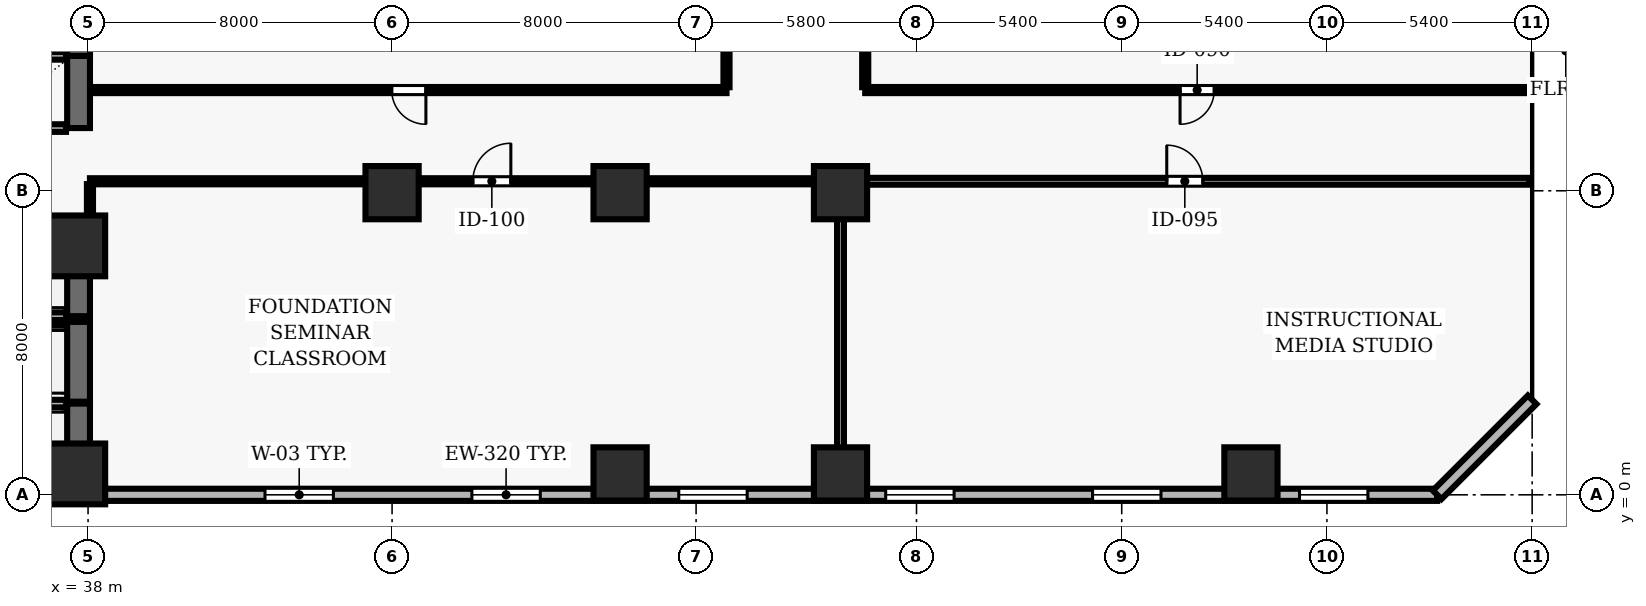
"""IFC4 building model, lengths in metres.
Left out: names, types, materials, properties, quantities, classifications, styles, units other than length and angle.
Written with IfcOpenShell. Run it as: python <this file> out.ifc"""

import sys

from ifc_helpers import new_model, si_unit, direction, frame, frame_2d, origin, origin_2d, place, context, subcontext, project, spatial, rectangle, extrude, element, fill, save


model = new_model("IFC4")
c1 = context("Model", 3, precision=1e-05, world=origin(), true_north=direction((0.0, 1.0)))
c2 = subcontext(c1, "Body", "Model", "MODEL_VIEW")
j1 = project(units=[si_unit("LENGTHUNIT", "METRE"), si_unit("PLANEANGLEUNIT", "RADIAN")], contexts=[c1])
p1 = place(None, origin())
s1 = spatial("IfcSite", under=j1, at=p1, CompositionType="ELEMENT")
p2 = place(p1, origin())
s2 = spatial("IfcBuilding", under=s1, at=p2, CompositionType="ELEMENT")
p3 = place(p2, frame((0.0, 0.0, 10.4)))
s3 = spatial("IfcBuildingStorey", under=s2, at=p3, CompositionType="ELEMENT", Elevation=10.4)
for number, where, z_axis, x_axis in (
    (1, (37.65, 0.55, 0.0), (0.0, 0.0, 1.0), (1.0, 0.0, 0.0)),
    (2, (37.65, 6.55, 0.0), (0.0, 0.0, 1.0), (1.0, 0.0, 0.0)),
):
    element("IfcColumn", number, at=place(p3, frame(where, z_axis=z_axis, x_axis=x_axis)), inside=s3, PredefinedType="COLUMN", context=c2, shape_type="SweptSolid", body=[
        extrude(rectangle(XDim=1.6, YDim=1.6, at=origin_2d()), origin(), (0.0, 0.0, 1.0), 5.2),
    ])
for number, where, z_axis, x_axis in (
    (3, (46.0, 7.95, 0.0), (0.0, 0.0, 1.0), (1.0, 0.0, 0.0)),
    (4, (52.0, 0.55, 0.0), (0.0, 0.0, 1.0), (1.0, 0.0, 0.0)),
    (5, (52.0, 7.95, 0.0), (0.0, 0.0, 1.0), (1.0, 0.0, 0.0)),
    (6, (57.8, 0.55, 0.0), (0.0, 0.0, 1.0), (1.0, 0.0, 0.0)),
    (7, (57.8, 7.95, 0.0), (0.0, 0.0, 1.0), (1.0, 0.0, 0.0)),
    (8, (68.6, 0.55, 0.0), (0.0, 0.0, 1.0), (1.0, 0.0, 0.0)),
):
    element("IfcColumn", number, at=place(p3, frame(where, z_axis=z_axis, x_axis=x_axis)), inside=s3, PredefinedType="COLUMN", context=c2, shape_type="SweptSolid", body=[
        extrude(rectangle(XDim=1.4, YDim=1.4, at=origin_2d()), origin(), (0.0, 0.0, 1.0), 5.2),
    ])
p4 = place(p3, frame((24.5, 0.0, 0.0), z_axis=(0.0, 0.0, 1.0), x_axis=(1.0, 0.0, 0.0)))
e9 = element("IfcWall", 9, at=p4, inside=s3, PredefinedType="SOLIDWALL", context=c2, shape_type="SweptSolid", body=[
    extrude(rectangle(XDim=49.0, YDim=0.32, at=frame_2d((24.5, 0.0))), origin(), (0.0, 0.0, 1.0), 4.92),
])
p5 = place(p4, frame((1.822, 0.0, 0.9)))
e10 = element("IfcOpeningElement", 10, at=p5, cuts=e9, PredefinedType="OPENING", context=c2, shape_type="SweptSolid", body=[
    extrude(rectangle(XDim=1.8, YDim=1.6, at=frame_2d((0.9, 0.8))), frame((0.0, 0.17, 0.0), z_axis=(0.0, -1.0, 0.0), x_axis=(1.0, 0.0, 0.0)), (0.0, 0.0, 1.0), 0.34),
])
p6 = place(p4, frame((18.156, 0.0, 0.9)))
e11 = element("IfcOpeningElement", 11, at=p6, cuts=e9, PredefinedType="OPENING", context=c2, shape_type="SweptSolid", body=[
    extrude(rectangle(XDim=1.8, YDim=1.6, at=frame_2d((0.9, 0.8))), frame((0.0, 0.17, 0.0), z_axis=(0.0, -1.0, 0.0), x_axis=(1.0, 0.0, 0.0)), (0.0, 0.0, 1.0), 0.34),
])
p7 = place(p4, frame((23.6, 0.0, 0.9)))
e12 = element("IfcOpeningElement", 12, at=p7, cuts=e9, PredefinedType="OPENING", context=c2, shape_type="SweptSolid", body=[
    extrude(rectangle(XDim=1.8, YDim=1.6, at=frame_2d((0.9, 0.8))), frame((0.0, 0.17, 0.0), z_axis=(0.0, -1.0, 0.0), x_axis=(1.0, 0.0, 0.0)), (0.0, 0.0, 1.0), 0.34),
])
p8 = place(p4, frame((29.044, 0.0, 0.9)))
e13 = element("IfcOpeningElement", 13, at=p8, cuts=e9, PredefinedType="OPENING", context=c2, shape_type="SweptSolid", body=[
    extrude(rectangle(XDim=1.8, YDim=1.6, at=frame_2d((0.9, 0.8))), frame((0.0, 0.17, 0.0), z_axis=(0.0, -1.0, 0.0), x_axis=(1.0, 0.0, 0.0)), (0.0, 0.0, 1.0), 0.34),
])
p9 = place(p4, frame((34.489, 0.0, 0.9)))
e14 = element("IfcOpeningElement", 14, at=p9, cuts=e9, PredefinedType="OPENING", context=c2, shape_type="SweptSolid", body=[
    extrude(rectangle(XDim=1.8, YDim=1.6, at=frame_2d((0.9, 0.8))), frame((0.0, 0.17, 0.0), z_axis=(0.0, -1.0, 0.0), x_axis=(1.0, 0.0, 0.0)), (0.0, 0.0, 1.0), 0.34),
])
p10 = place(p4, frame((39.933, 0.0, 0.9)))
e15 = element("IfcOpeningElement", 15, at=p10, cuts=e9, PredefinedType="OPENING", context=c2, shape_type="SweptSolid", body=[
    extrude(rectangle(XDim=1.8, YDim=1.6, at=frame_2d((0.9, 0.8))), frame((0.0, 0.17, 0.0), z_axis=(0.0, -1.0, 0.0), x_axis=(1.0, 0.0, 0.0)), (0.0, 0.0, 1.0), 0.34),
])
p11 = place(p4, frame((45.378, 0.0, 0.9)))
e16 = element("IfcOpeningElement", 16, at=p11, cuts=e9, PredefinedType="OPENING", context=c2, shape_type="SweptSolid", body=[
    extrude(rectangle(XDim=1.8, YDim=1.6, at=frame_2d((0.9, 0.8))), frame((0.0, 0.17, 0.0), z_axis=(0.0, -1.0, 0.0), x_axis=(1.0, 0.0, 0.0)), (0.0, 0.0, 1.0), 0.34),
])
p12 = place(p3, frame((73.5, 0.0, 0.0), z_axis=(0.0, 0.0, 1.0), x_axis=(0.707106781187, 0.707106781187, 0.0)))
e17 = element("IfcWall", 17, at=p12, inside=s3, PredefinedType="SOLIDWALL", context=c2, shape_type="SweptSolid", body=[
    extrude(rectangle(XDim=3.536, YDim=0.32, at=frame_2d((1.768, 0.0))), origin(), (0.0, 0.0, 1.0), 4.92),
])
p13 = place(p3, frame((37.75, 0.3, 0.0), z_axis=(0.0, 0.0, 1.0), x_axis=(0.0, 1.0, 0.0)))
e18 = element("IfcWall", 18, at=p13, inside=s3, PredefinedType="SHEAR", context=c2, shape_type="SweptSolid", body=[
    extrude(rectangle(XDim=2.1, YDim=0.6, at=frame_2d((1.05, 0.0))), origin(), (0.0, 0.0, 1.0), 4.92),
])
for number, where, z_axis, x_axis in (
    (19, (35.28, 0.3, 0.0), (0.0, 0.0, 1.0), (1.0, 0.0, 0.0)),
    (20, (37.42, 2.4, 0.0), (0.0, 0.0, 1.0), (-1.0, 0.0, 0.0)),
):
    element("IfcWall", number, at=place(p3, frame(where, z_axis=z_axis, x_axis=x_axis)), inside=s3, PredefinedType="SOLIDWALL", context=c2, shape_type="SweptSolid", body=[
        extrude(rectangle(XDim=2.14, YDim=0.2, at=frame_2d((1.07, 0.0))), origin(), (0.0, 0.0, 1.0), 4.92),
    ])
p14 = place(p3, frame((37.75, 2.45, 0.0), z_axis=(0.0, 0.0, 1.0), x_axis=(0.0, 1.0, 0.0)))
e21 = element("IfcWall", 21, at=p14, inside=s3, PredefinedType="SHEAR", context=c2, shape_type="SweptSolid", body=[
    extrude(rectangle(XDim=2.1, YDim=0.6, at=frame_2d((1.05, 0.0))), origin(), (0.0, 0.0, 1.0), 4.92),
])
p15 = place(p3, frame((37.42, 4.55, 0.0), z_axis=(0.0, 0.0, 1.0), x_axis=(-1.0, 0.0, 0.0)))
e22 = element("IfcWall", 22, at=p15, inside=s3, PredefinedType="SOLIDWALL", context=c2, shape_type="SweptSolid", body=[
    extrude(rectangle(XDim=2.14, YDim=0.2, at=frame_2d((1.07, 0.0))), origin(), (0.0, 0.0, 1.0), 4.92),
])
p16 = place(p3, frame((37.75, 4.7, 0.0), z_axis=(0.0, 0.0, 1.0), x_axis=(0.0, 1.0, 0.0)))
e23 = element("IfcWall", 23, at=p16, inside=s3, PredefinedType="SHEAR", context=c2, shape_type="SweptSolid", body=[
    extrude(rectangle(XDim=2.25, YDim=0.6, at=frame_2d((1.125, 0.0))), origin(), (0.0, 0.0, 1.0), 4.92),
])
for number, where, z_axis, x_axis in (
    (24, (35.28, 4.7, 0.0), (0.0, 0.0, 1.0), (1.0, 0.0, 0.0)),
    (25, (37.42, 6.95, 0.0), (0.0, 0.0, 1.0), (-1.0, 0.0, 0.0)),
):
    element("IfcWall", number, at=place(p3, frame(where, z_axis=z_axis, x_axis=x_axis)), inside=s3, PredefinedType="SOLIDWALL", context=c2, shape_type="SweptSolid", body=[
        extrude(rectangle(XDim=2.14, YDim=0.2, at=frame_2d((1.07, 0.0))), origin(), (0.0, 0.0, 1.0), 4.92),
    ])
p17 = place(p3, frame((37.75, 9.65, 0.0), z_axis=(0.0, 0.0, 1.0), x_axis=(0.0, 1.0, 0.0)))
e26 = element("IfcWall", 26, at=p17, inside=s3, PredefinedType="SHEAR", context=c2, shape_type="SweptSolid", body=[
    extrude(rectangle(XDim=1.9, YDim=0.6, at=frame_2d((0.95, 0.0))), origin(), (0.0, 0.0, 1.0), 4.92),
])
for number, where, z_axis, x_axis in (
    (27, (35.28, 9.65, 0.0), (0.0, 0.0, 1.0), (1.0, 0.0, 0.0)),
    (28, (37.42, 11.55, 0.0), (0.0, 0.0, 1.0), (-1.0, 0.0, 0.0)),
):
    element("IfcWall", number, at=place(p3, frame(where, z_axis=z_axis, x_axis=x_axis)), inside=s3, PredefinedType="SOLIDWALL", context=c2, shape_type="SweptSolid", body=[
        extrude(rectangle(XDim=2.14, YDim=0.2, at=frame_2d((1.07, 0.0))), origin(), (0.0, 0.0, 1.0), 4.92),
    ])
p18 = place(p3, frame((37.75, 11.55, 0.0), z_axis=(0.0, 0.0, 1.0), x_axis=(0.0, 1.0, 0.0)))
e29 = element("IfcWall", 29, at=p18, inside=s3, PredefinedType="SHEAR", context=c2, shape_type="SweptSolid", body=[
    extrude(rectangle(XDim=2.35, YDim=0.6, at=frame_2d((1.175, 0.0))), origin(), (0.0, 0.0, 1.0), 4.92),
])
p19 = place(p3, frame((38.05, 8.25, 0.0), z_axis=(0.0, 0.0, 1.0), x_axis=(1.0, 0.0, 0.0)))
e30 = element("IfcWall", 30, at=p19, inside=s3, PredefinedType="PARTITIONING", context=c2, shape_type="SweptSolid", body=[
    extrude(rectangle(XDim=19.75, YDim=0.16, at=frame_2d((9.875, 0.0))), origin(), (0.0, 0.0, 1.0), 4.065),
])
p20 = place(p19, frame((10.075, 0.0, 0.0)))
e31 = element("IfcOpeningElement", 31, at=p20, cuts=e30, PredefinedType="OPENING", context=c2, shape_type="SweptSolid", body=[
    extrude(rectangle(XDim=1.0, YDim=2.1, at=frame_2d((0.5, 1.05))), frame((0.0, 0.09, 0.0), z_axis=(0.0, -1.0, 0.0), x_axis=(1.0, 0.0, 0.0)), (0.0, 0.0, 1.0), 0.18),
])
p21 = place(p3, frame((54.8, 10.65, 0.0), z_axis=(0.0, 0.0, 1.0), x_axis=(-1.0, 0.0, 0.0)))
e32 = element("IfcWall", 32, at=p21, inside=s3, PredefinedType="PARTITIONING", context=c2, shape_type="SweptSolid", body=[
    extrude(rectangle(XDim=16.72, YDim=0.16, at=frame_2d((8.36, 0.0))), origin(), (0.0, 0.0, 1.0), 4.451),
])
p22 = place(p21, frame((7.91, 0.0, 0.0)))
e33 = element("IfcOpeningElement", 33, at=p22, cuts=e32, PredefinedType="OPENING", context=c2, shape_type="SweptSolid", body=[
    extrude(rectangle(XDim=0.9, YDim=2.1, at=frame_2d((0.45, 1.05))), frame((0.0, 0.09, 0.0), z_axis=(0.0, -1.0, 0.0), x_axis=(1.0, 0.0, 0.0)), (0.0, 0.0, 1.0), 0.18),
])
p23 = place(p3, frame((57.8, 8.25, 0.0), z_axis=(0.0, 0.0, 1.0), x_axis=(1.0, 0.0, 0.0)))
e34 = element("IfcWall", 34, at=p23, inside=s3, PredefinedType="PARTITIONING", context=c2, shape_type="SweptSolid", body=[
    extrude(rectangle(XDim=18.12, YDim=0.18, at=frame_2d((9.06, 0.0))), origin(), (0.0, 0.0, 1.0), 4.92),
])
p24 = place(p23, frame((8.585, 0.0, 0.0)))
e35 = element("IfcOpeningElement", 35, at=p24, cuts=e34, PredefinedType="OPENING", context=c2, shape_type="SweptSolid", body=[
    extrude(rectangle(XDim=0.95, YDim=2.1, at=frame_2d((0.475, 1.05))), frame((0.0, 0.1, 0.0), z_axis=(0.0, -1.0, 0.0), x_axis=(1.0, 0.0, 0.0)), (0.0, 0.0, 1.0), 0.2),
])
p25 = place(p3, frame((75.92, 10.65, 0.0), z_axis=(0.0, 0.0, 1.0), x_axis=(-1.0, 0.0, 0.0)))
e36 = element("IfcWall", 36, at=p25, inside=s3, PredefinedType="PARTITIONING", context=c2, shape_type="SweptSolid", body=[
    extrude(rectangle(XDim=17.47, YDim=0.16, at=frame_2d((8.735, 0.0))), origin(), (0.0, 0.0, 1.0), 4.451),
])
p26 = place(p25, frame((8.285, 0.0, 0.0)))
e37 = element("IfcOpeningElement", 37, at=p26, cuts=e36, PredefinedType="OPENING", context=c2, shape_type="SweptSolid", body=[
    extrude(rectangle(XDim=0.9, YDim=2.1, at=frame_2d((0.45, 1.05))), frame((0.0, 0.09, 0.0), z_axis=(0.0, -1.0, 0.0), x_axis=(1.0, 0.0, 0.0)), (0.0, 0.0, 1.0), 0.18),
])
p27 = place(p3, frame((38.05, 7.05, 0.0), z_axis=(0.0, 0.0, 1.0), x_axis=(0.0, 1.0, 0.0)))
e38 = element("IfcWall", 38, at=p27, inside=s3, PredefinedType="PARTITIONING", context=c2, shape_type="SweptSolid", body=[
    extrude(rectangle(XDim=1.125, YDim=0.16, at=frame_2d((0.562, 0.0))), origin(), (0.0, 0.0, 1.0), 4.065),
])
p28 = place(p3, frame((54.8, 15.115, 0.0), z_axis=(0.0, 0.0, 1.0), x_axis=(0.0, -1.0, 0.0)))
e39 = element("IfcWall", 39, at=p28, inside=s3, PredefinedType="PARTITIONING", context=c2, shape_type="SweptSolid", body=[
    extrude(rectangle(XDim=4.39, YDim=0.16, at=frame_2d((2.195, 0.0))), origin(), (0.0, 0.0, 1.0), 4.92),
])
p29 = place(p3, frame((57.8, 0.155, 0.0), z_axis=(0.0, 0.0, 1.0), x_axis=(0.0, 1.0, 0.0)))
e40 = element("IfcWall", 40, at=p29, inside=s3, PredefinedType="PARTITIONING", context=c2, shape_type="SweptSolid", body=[
    extrude(rectangle(XDim=8.01, YDim=0.18, at=frame_2d((4.005, 0.0))), origin(), (0.0, 0.0, 1.0), 4.065),
])
p30 = place(p3, frame((58.45, 10.725, 0.0), z_axis=(0.0, 0.0, 1.0), x_axis=(0.0, 1.0, 0.0)))
e41 = element("IfcWall", 41, at=p30, inside=s3, PredefinedType="PARTITIONING", context=c2, shape_type="SweptSolid", body=[
    extrude(rectangle(XDim=13.675, YDim=0.16, at=frame_2d((6.837, 0.0))), origin(), (0.0, 0.0, 1.0), 4.92),
])
p31 = place(p6, origin())
e42 = element("IfcWindow", 42, at=p31, inside=s3, PartitioningType="SINGLE_PANEL", PredefinedType="WINDOW", context=c2, shape_type="SweptSolid", body=[
    extrude(rectangle(XDim=1.8, YDim=1.6, at=frame_2d((0.9, 0.8))), frame((0.0, 0.03, 0.0), z_axis=(0.0, -1.0, 0.0), x_axis=(1.0, 0.0, 0.0)), (0.0, 0.0, 1.0), 0.06),
])
fill(e11, e42)
p32 = place(p7, origin())
e43 = element("IfcWindow", 43, at=p32, inside=s3, PartitioningType="SINGLE_PANEL", PredefinedType="WINDOW", context=c2, shape_type="SweptSolid", body=[
    extrude(rectangle(XDim=1.8, YDim=1.6, at=frame_2d((0.9, 0.8))), frame((0.0, 0.03, 0.0), z_axis=(0.0, -1.0, 0.0), x_axis=(1.0, 0.0, 0.0)), (0.0, 0.0, 1.0), 0.06),
])
fill(e12, e43)
p33 = place(p8, origin())
e44 = element("IfcWindow", 44, at=p33, inside=s3, PartitioningType="SINGLE_PANEL", PredefinedType="WINDOW", context=c2, shape_type="SweptSolid", body=[
    extrude(rectangle(XDim=1.8, YDim=1.6, at=frame_2d((0.9, 0.8))), frame((0.0, 0.03, 0.0), z_axis=(0.0, -1.0, 0.0), x_axis=(1.0, 0.0, 0.0)), (0.0, 0.0, 1.0), 0.06),
])
fill(e13, e44)
p34 = place(p9, origin())
e45 = element("IfcWindow", 45, at=p34, inside=s3, PartitioningType="SINGLE_PANEL", PredefinedType="WINDOW", context=c2, shape_type="SweptSolid", body=[
    extrude(rectangle(XDim=1.8, YDim=1.6, at=frame_2d((0.9, 0.8))), frame((0.0, 0.03, 0.0), z_axis=(0.0, -1.0, 0.0), x_axis=(1.0, 0.0, 0.0)), (0.0, 0.0, 1.0), 0.06),
])
fill(e14, e45)
p35 = place(p10, origin())
e46 = element("IfcWindow", 46, at=p35, inside=s3, PartitioningType="SINGLE_PANEL", PredefinedType="WINDOW", context=c2, shape_type="SweptSolid", body=[
    extrude(rectangle(XDim=1.8, YDim=1.6, at=frame_2d((0.9, 0.8))), frame((0.0, 0.03, 0.0), z_axis=(0.0, -1.0, 0.0), x_axis=(1.0, 0.0, 0.0)), (0.0, 0.0, 1.0), 0.06),
])
fill(e15, e46)
p36 = place(p11, origin())
e47 = element("IfcWindow", 47, at=p36, inside=s3, PartitioningType="SINGLE_PANEL", PredefinedType="WINDOW", context=c2, shape_type="SweptSolid", body=[
    extrude(rectangle(XDim=1.8, YDim=1.6, at=frame_2d((0.9, 0.8))), frame((0.0, 0.03, 0.0), z_axis=(0.0, -1.0, 0.0), x_axis=(1.0, 0.0, 0.0)), (0.0, 0.0, 1.0), 0.06),
])
fill(e16, e47)
p37 = place(p26, origin())
e48 = element("IfcDoor", 48, at=p37, inside=s3, OperationType="SINGLE_SWING_RIGHT", PredefinedType="DOOR", context=c2, shape_type="SweptSolid", body=[
    extrude(rectangle(XDim=0.9, YDim=2.1, at=frame_2d((0.45, 1.05))), frame((0.0, 0.025, 0.0), z_axis=(0.0, -1.0, 0.0), x_axis=(1.0, 0.0, 0.0)), (0.0, 0.0, 1.0), 0.05),
])
fill(e37, e48)
p38 = place(p22, origin())
e49 = element("IfcDoor", 49, at=p38, inside=s3, OperationType="SINGLE_SWING_LEFT", PredefinedType="DOOR", context=c2, shape_type="SweptSolid", body=[
    extrude(rectangle(XDim=0.9, YDim=2.1, at=frame_2d((0.45, 1.05))), frame((0.0, 0.025, 0.0), z_axis=(0.0, -1.0, 0.0), x_axis=(1.0, 0.0, 0.0)), (0.0, 0.0, 1.0), 0.05),
])
fill(e33, e49)
p39 = place(p20, origin())
e50 = element("IfcDoor", 50, at=p39, inside=s3, OperationType="SINGLE_SWING_RIGHT", PredefinedType="DOOR", context=c2, shape_type="SweptSolid", body=[
    extrude(rectangle(XDim=1.0, YDim=2.1, at=frame_2d((0.5, 1.05))), frame((0.0, 0.025, 0.0), z_axis=(0.0, -1.0, 0.0), x_axis=(1.0, 0.0, 0.0)), (0.0, 0.0, 1.0), 0.05),
])
fill(e31, e50)
p40 = place(p24, origin())
e51 = element("IfcDoor", 51, at=p40, inside=s3, OperationType="SINGLE_SWING_LEFT", PredefinedType="DOOR", context=c2, shape_type="SweptSolid", body=[
    extrude(rectangle(XDim=0.95, YDim=2.1, at=frame_2d((0.475, 1.05))), frame((0.0, 0.025, 0.0), z_axis=(0.0, -1.0, 0.0), x_axis=(1.0, 0.0, 0.0)), (0.0, 0.0, 1.0), 0.05),
])
fill(e35, e51)
save(model, sys.argv[1])
